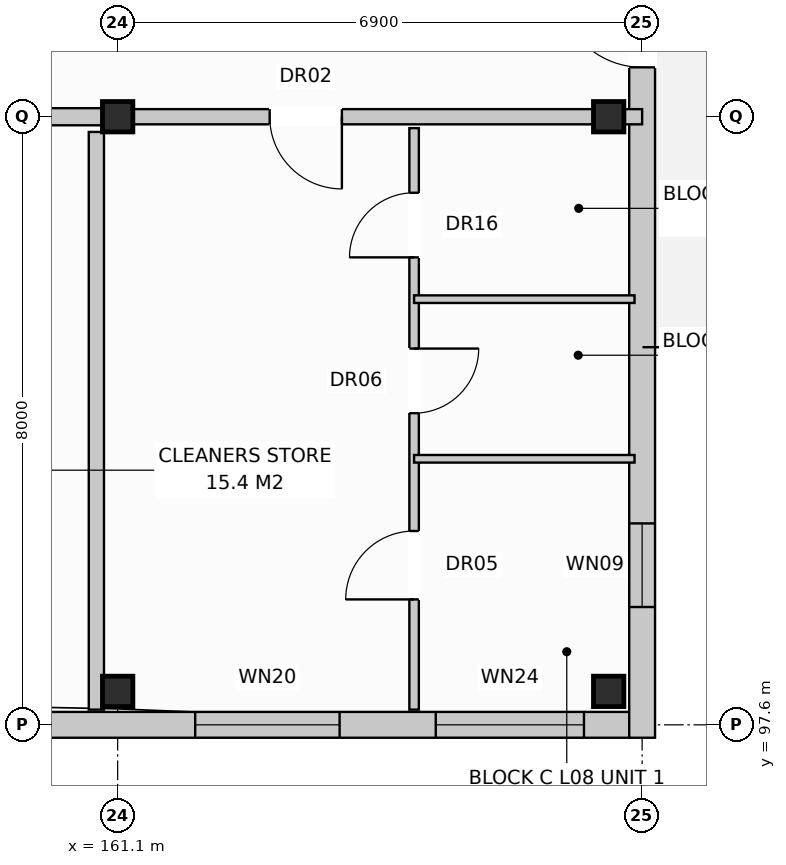
"""IFC4 building model, lengths in metres.
Left out: names, types, materials, properties, quantities, classifications, styles, units other than length and angle.
Written with IfcOpenShell. Run it as: python <this file> out.ifc"""

import sys

from ifc_helpers import new_model, si_unit, direction, frame, frame_2d, origin, origin_with_axes, origin_2d, place, context, subcontext, project, spatial, rectangle, extrude, element, fill, save


model = new_model("IFC4")
c1 = context("Model", 3, precision=1e-05, world=origin(), true_north=direction((0.0, 1.0)))
c2 = subcontext(c1, "Body", "Model", "MODEL_VIEW")
j1 = project(units=[si_unit("LENGTHUNIT", "METRE"), si_unit("PLANEANGLEUNIT", "RADIAN")], contexts=[c1])
p1 = place(None, origin())
s1 = spatial("IfcSite", under=j1, at=p1, CompositionType="ELEMENT")
p2 = place(p1, origin())
s2 = spatial("IfcBuilding", under=s1, at=p2, CompositionType="ELEMENT")
p3 = place(p2, frame((0.0, 0.0, 27.2)))
s3 = spatial("IfcBuildingStorey", under=s2, at=p3, CompositionType="ELEMENT", Elevation=27.2)
for number, where, z_axis, x_axis in (
    (1, (161.1, 98.04, 0.0), (0.0, 0.0, 1.0), (1.0, 0.0, 0.0)),
    (2, (161.1, 105.6, 0.0), (0.0, 0.0, 1.0), (1.0, 0.0, 0.0)),
    (3, (167.56, 98.04, 0.0), (0.0, 0.0, 1.0), (1.0, 0.0, 0.0)),
    (4, (167.56, 105.6, 0.0), (0.0, 0.0, 1.0), (1.0, 0.0, 0.0)),
):
    element("IfcColumn", number, at=place(p3, frame(where, z_axis=z_axis, x_axis=x_axis)), inside=s3, PredefinedType="COLUMN", context=c2, shape_type="SweptSolid", body=[
        extrude(rectangle(XDim=0.4, YDim=0.4, at=origin_2d()), origin(), (0.0, 0.0, 1.0), 3.2),
    ])
p4 = place(p3, frame((151.05, 97.6, 0.0), z_axis=(0.0, 0.0, 1.0), x_axis=(1.0, 0.0, 0.0)))
e5 = element("IfcWall", 5, at=p4, inside=s3, PredefinedType="STANDARD", context=c2, shape_type="SweptSolid", body=[
    extrude(rectangle(XDim=16.79, YDim=0.34, at=frame_2d((8.395, 0.0))), origin(), (0.0, 0.0, 1.0), 2.96),
])
p5 = place(p4, frame((11.07, 0.0, 0.8)))
e6 = element("IfcOpeningElement", 6, at=p5, cuts=e5, PredefinedType="OPENING", context=c2, shape_type="SweptSolid", body=[
    extrude(rectangle(XDim=1.9, YDim=1.85, at=frame_2d((0.95, 0.925))), frame((0.0, 0.182, 0.0), z_axis=(0.0, -1.0, 0.0), x_axis=(1.0, 0.0, 0.0)), (0.0, 0.0, 1.0), 0.364),
])
p6 = place(p4, frame((14.235, 0.0, 0.8)))
e7 = element("IfcOpeningElement", 7, at=p6, cuts=e5, PredefinedType="OPENING", context=c2, shape_type="SweptSolid", body=[
    extrude(rectangle(XDim=1.95, YDim=1.65, at=frame_2d((0.975, 0.825))), frame((0.0, 0.182, 0.0), z_axis=(0.0, -1.0, 0.0), x_axis=(1.0, 0.0, 0.0)), (0.0, 0.0, 1.0), 0.364),
])
p7 = place(p3, frame((168.0, 97.43, 0.0), z_axis=(0.0, 0.0, 1.0), x_axis=(0.0, 1.0, 0.0)))
e8 = element("IfcWall", 8, at=p7, inside=s3, PredefinedType="STANDARD", context=c2, shape_type="SweptSolid", body=[
    extrude(rectangle(XDim=18.74, YDim=0.34, at=frame_2d((9.37, 0.0))), origin(), (0.0, 0.0, 1.0), 2.96),
])
p8 = place(p7, frame((8.82, 0.0, 0.0)))
e9 = element("IfcOpeningElement", 9, at=p8, cuts=e8, PredefinedType="OPENING", context=c2, shape_type="SweptSolid", body=[
    extrude(rectangle(XDim=1.1, YDim=2.1, at=frame_2d((0.55, 1.05))), frame((0.0, 0.182, 0.0), z_axis=(0.0, -1.0, 0.0), x_axis=(1.0, 0.0, 0.0)), (0.0, 0.0, 1.0), 0.364),
])
p9 = place(p7, frame((1.72, 0.0, 0.72)))
e10 = element("IfcOpeningElement", 10, at=p9, cuts=e8, PredefinedType="OPENING", context=c2, shape_type="SweptSolid", body=[
    extrude(rectangle(XDim=1.1, YDim=1.5, at=frame_2d((0.55, 0.75))), frame((0.0, 0.182, 0.0), z_axis=(0.0, -1.0, 0.0), x_axis=(1.0, 0.0, 0.0)), (0.0, 0.0, 1.0), 0.364),
])
p10 = place(p7, frame((15.92, 0.0, 0.72)))
e11 = element("IfcOpeningElement", 11, at=p10, cuts=e8, PredefinedType="OPENING", context=c2, shape_type="SweptSolid", body=[
    extrude(rectangle(XDim=1.1, YDim=1.5, at=frame_2d((0.55, 0.75))), frame((0.0, 0.182, 0.0), z_axis=(0.0, -1.0, 0.0), x_axis=(1.0, 0.0, 0.0)), (0.0, 0.0, 1.0), 0.364),
])
p11 = place(p3, frame((160.82, 97.8, 0.0), z_axis=(0.0, 0.0, 1.0), x_axis=(0.0, 1.0, 0.0)))
e12 = element("IfcWall", 12, at=p11, inside=s3, PredefinedType="PARTITIONING", context=c2, shape_type="SweptSolid", body=[
    extrude(rectangle(XDim=7.6, YDim=0.2, at=frame_2d((3.8, 0.0))), origin(), (0.0, 0.0, 1.0), 2.4),
])
p12 = place(p3, frame((151.2, 105.6, 0.0), z_axis=(0.0, 0.0, 1.0), x_axis=(1.0, 0.0, 0.0)))
e13 = element("IfcWall", 13, at=p12, inside=s3, PredefinedType="PARTITIONING", context=c2, shape_type="SweptSolid", body=[
    extrude(rectangle(XDim=9.9, YDim=0.225, at=frame_2d((4.95, 0.0))), origin(), (0.0, 0.0, 1.0), 2.4),
])
p13 = place(p12, frame((0.475, 0.0, 0.0)))
e14 = element("IfcOpeningElement", 14, at=p13, cuts=e13, PredefinedType="OPENING", context=c2, shape_type="SweptSolid", body=[
    extrude(rectangle(XDim=1.1, YDim=2.15, at=frame_2d((0.55, 1.075))), frame((0.0, 0.125, 0.0), z_axis=(0.0, -1.0, 0.0), x_axis=(1.0, 0.0, 0.0)), (0.0, 0.0, 1.0), 0.249),
])
p14 = place(p12, frame((5.75, 0.0, 0.0)))
e15 = element("IfcOpeningElement", 15, at=p14, cuts=e13, PredefinedType="OPENING", context=c2, shape_type="SweptSolid", body=[
    extrude(rectangle(XDim=0.9, YDim=2.1, at=frame_2d((0.45, 1.05))), frame((0.0, 0.125, 0.0), z_axis=(0.0, -1.0, 0.0), x_axis=(1.0, 0.0, 0.0)), (0.0, 0.0, 1.0), 0.249),
])
p15 = place(p12, frame((7.8, 0.0, 0.0)))
e16 = element("IfcOpeningElement", 16, at=p15, cuts=e13, PredefinedType="OPENING", context=c2, shape_type="SweptSolid", body=[
    extrude(rectangle(XDim=0.95, YDim=2.15, at=frame_2d((0.475, 1.075))), frame((0.0, 0.125, 0.0), z_axis=(0.0, -1.0, 0.0), x_axis=(1.0, 0.0, 0.0)), (0.0, 0.0, 1.0), 0.249),
])
p16 = place(p3, frame((161.1, 105.6, 0.0), z_axis=(0.0, 0.0, 1.0), x_axis=(1.0, 0.0, 0.0)))
e17 = element("IfcWall", 17, at=p16, inside=s3, PredefinedType="PARTITIONING", context=c2, shape_type="SweptSolid", body=[
    extrude(rectangle(XDim=6.9, YDim=0.2, at=frame_2d((3.45, 0.0))), origin(), (0.0, 0.0, 1.0), 2.4),
])
p17 = place(p16, frame((2.0, 0.0, 0.0)))
e18 = element("IfcOpeningElement", 18, at=p17, cuts=e17, PredefinedType="OPENING", context=c2, shape_type="SweptSolid", body=[
    extrude(rectangle(XDim=0.95, YDim=2.15, at=frame_2d((0.475, 1.075))), frame((0.0, 0.112, 0.0), z_axis=(0.0, -1.0, 0.0), x_axis=(1.0, 0.0, 0.0)), (0.0, 0.0, 1.0), 0.224),
])
p18 = place(p3, frame((165.0, 105.45, 0.0), z_axis=(0.0, 0.0, 1.0), x_axis=(0.0, -1.0, 0.0)))
e19 = element("IfcWall", 19, at=p18, inside=s3, PredefinedType="PARTITIONING", context=c2, shape_type="SweptSolid", body=[
    extrude(rectangle(XDim=7.65, YDim=0.125, at=frame_2d((3.825, 0.0))), origin(), (0.0, 0.0, 1.0), 2.59),
])
p19 = place(p18, frame((0.85, 0.0, 0.0)))
e20 = element("IfcOpeningElement", 20, at=p19, cuts=e19, PredefinedType="OPENING", context=c2, shape_type="SweptSolid", body=[
    extrude(rectangle(XDim=0.85, YDim=2.1, at=frame_2d((0.425, 1.05))), frame((0.0, 0.074, 0.0), z_axis=(0.0, -1.0, 0.0), x_axis=(1.0, 0.0, 0.0)), (0.0, 0.0, 1.0), 0.149),
])
p20 = place(p18, frame((2.9, 0.0, 0.0)))
e21 = element("IfcOpeningElement", 21, at=p20, cuts=e19, PredefinedType="OPENING", context=c2, shape_type="SweptSolid", body=[
    extrude(rectangle(XDim=0.85, YDim=2.05, at=frame_2d((0.425, 1.025))), frame((0.0, 0.074, 0.0), z_axis=(0.0, -1.0, 0.0), x_axis=(1.0, 0.0, 0.0)), (0.0, 0.0, 1.0), 0.149),
])
p21 = place(p18, frame((5.3, 0.0, 0.0)))
e22 = element("IfcOpeningElement", 22, at=p21, cuts=e19, PredefinedType="OPENING", context=c2, shape_type="SweptSolid", body=[
    extrude(rectangle(XDim=0.9, YDim=2.1, at=frame_2d((0.45, 1.05))), frame((0.0, 0.074, 0.0), z_axis=(0.0, -1.0, 0.0), x_axis=(1.0, 0.0, 0.0)), (0.0, 0.0, 1.0), 0.149),
])
for number, where, z_axis, x_axis in (
    (23, (165.0, 103.2, 0.0), (0.0, 0.0, 1.0), (1.0, 0.0, 0.0)),
    (24, (165.0, 101.1, 0.0), (0.0, 0.0, 1.0), (1.0, 0.0, 0.0)),
):
    element("IfcWall", number, at=place(p3, frame(where, z_axis=z_axis, x_axis=x_axis)), inside=s3, PredefinedType="PARTITIONING", context=c2, shape_type="SweptSolid", body=[
        extrude(rectangle(XDim=2.9, YDim=0.1, at=frame_2d((1.45, 0.0))), origin(), (0.0, 0.0, 1.0), 2.96),
    ])
p22 = place(p5, origin_with_axes())
e25 = element("IfcWindow", 25, at=p22, inside=s3, PartitioningType="SINGLE_PANEL", PredefinedType="WINDOW", context=c2, shape_type="SweptSolid", body=[
    extrude(rectangle(XDim=1.9, YDim=1.85, at=frame_2d((0.95, 0.925))), frame((0.0, 0.03, 0.0), z_axis=(0.0, -1.0, 0.0), x_axis=(1.0, 0.0, 0.0)), (0.0, 0.0, 1.0), 0.06),
])
fill(e6, e25)
p23 = place(p6, origin_with_axes())
e26 = element("IfcWindow", 26, at=p23, inside=s3, PartitioningType="SINGLE_PANEL", PredefinedType="WINDOW", context=c2, shape_type="SweptSolid", body=[
    extrude(rectangle(XDim=1.95, YDim=1.65, at=frame_2d((0.975, 0.825))), frame((0.0, 0.03, 0.0), z_axis=(0.0, -1.0, 0.0), x_axis=(1.0, 0.0, 0.0)), (0.0, 0.0, 1.0), 0.06),
])
fill(e7, e26)
p24 = place(p8, origin_with_axes())
e27 = element("IfcDoor", 27, at=p24, inside=s3, OperationType="SINGLE_SWING_RIGHT", PredefinedType="DOOR", context=c2, shape_type="SweptSolid", body=[
    extrude(rectangle(XDim=1.1, YDim=2.1, at=frame_2d((0.55, 1.05))), frame((0.0, 0.025, 0.0), z_axis=(0.0, -1.0, 0.0), x_axis=(1.0, 0.0, 0.0)), (0.0, 0.0, 1.0), 0.05),
])
fill(e9, e27)
p25 = place(p9, origin_with_axes())
e28 = element("IfcWindow", 28, at=p25, inside=s3, PartitioningType="SINGLE_PANEL", PredefinedType="WINDOW", context=c2, shape_type="SweptSolid", body=[
    extrude(rectangle(XDim=1.1, YDim=1.5, at=frame_2d((0.55, 0.75))), frame((0.0, 0.03, 0.0), z_axis=(0.0, -1.0, 0.0), x_axis=(1.0, 0.0, 0.0)), (0.0, 0.0, 1.0), 0.06),
])
fill(e10, e28)
p26 = place(p17, frame((0.95, 0.0, 0.0), z_axis=(0.0, 0.0, 1.0), x_axis=(-1.0, 0.0, 0.0)))
e29 = element("IfcDoor", 29, at=p26, inside=s3, OperationType="SINGLE_SWING_RIGHT", PredefinedType="DOOR", context=c2, shape_type="SweptSolid", body=[
    extrude(rectangle(XDim=0.95, YDim=2.15, at=frame_2d((0.475, 1.075))), frame((0.0, 0.025, 0.0), z_axis=(0.0, -1.0, 0.0), x_axis=(1.0, 0.0, 0.0)), (0.0, 0.0, 1.0), 0.05),
])
fill(e18, e29)
p27 = place(p19, frame((0.85, 0.0, 0.0), z_axis=(0.0, 0.0, 1.0), x_axis=(-1.0, 0.0, 0.0)))
e30 = element("IfcDoor", 30, at=p27, inside=s3, OperationType="SINGLE_SWING_RIGHT", PredefinedType="DOOR", context=c2, shape_type="SweptSolid", body=[
    extrude(rectangle(XDim=0.85, YDim=2.1, at=frame_2d((0.425, 1.05))), frame((0.0, 0.025, 0.0), z_axis=(0.0, -1.0, 0.0), x_axis=(1.0, 0.0, 0.0)), (0.0, 0.0, 1.0), 0.05),
])
fill(e20, e30)
p28 = place(p20, origin_with_axes())
e31 = element("IfcDoor", 31, at=p28, inside=s3, OperationType="SINGLE_SWING_LEFT", PredefinedType="DOOR", context=c2, shape_type="SweptSolid", body=[
    extrude(rectangle(XDim=0.85, YDim=2.05, at=frame_2d((0.425, 1.025))), frame((0.0, 0.025, 0.0), z_axis=(0.0, -1.0, 0.0), x_axis=(1.0, 0.0, 0.0)), (0.0, 0.0, 1.0), 0.05),
])
fill(e21, e31)
p29 = place(p21, frame((0.9, 0.0, 0.0), z_axis=(0.0, 0.0, 1.0), x_axis=(-1.0, 0.0, 0.0)))
e32 = element("IfcDoor", 32, at=p29, inside=s3, OperationType="SINGLE_SWING_RIGHT", PredefinedType="DOOR", context=c2, shape_type="SweptSolid", body=[
    extrude(rectangle(XDim=0.9, YDim=2.1, at=frame_2d((0.45, 1.05))), frame((0.0, 0.025, 0.0), z_axis=(0.0, -1.0, 0.0), x_axis=(1.0, 0.0, 0.0)), (0.0, 0.0, 1.0), 0.05),
])
fill(e22, e32)
save(model, sys.argv[1])
